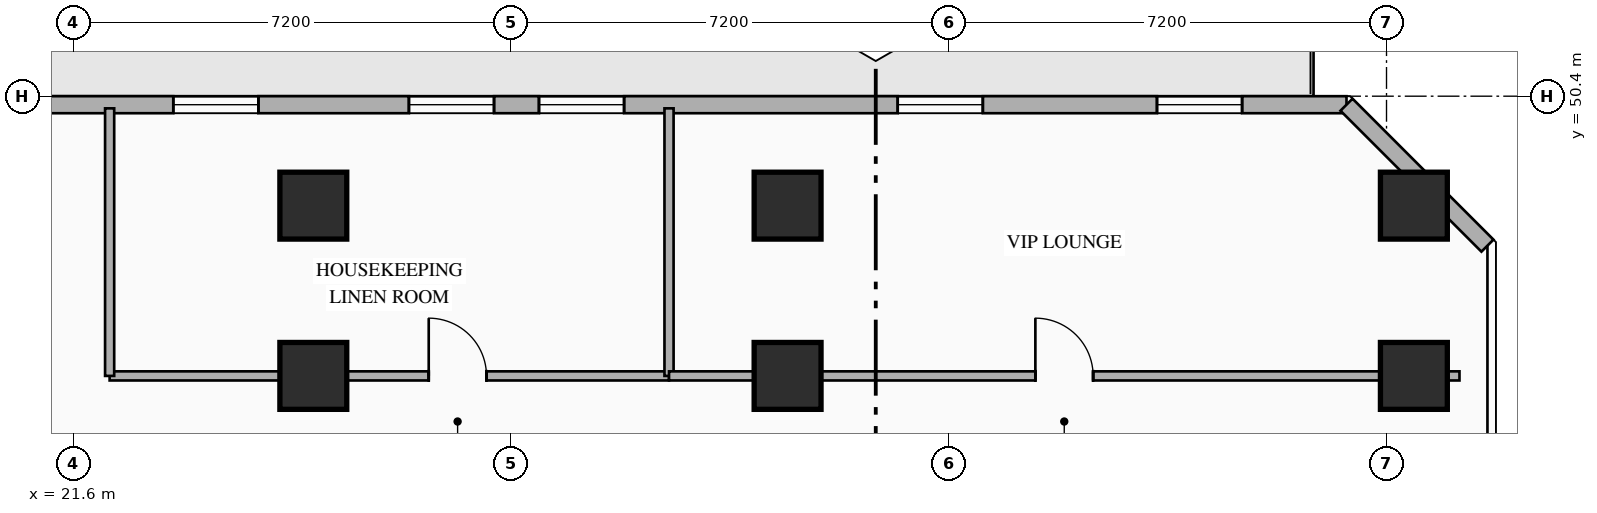
"""IFC4 building model, lengths in metres.
Left out: names, types, materials, properties, quantities, classifications, styles, units other than length and angle.
Written with IfcOpenShell. Run it as: python <this file> out.ifc"""

import sys

from ifc_helpers import new_model, si_unit, direction, frame, frame_2d, origin, origin_2d, place, context, subcontext, project, spatial, rectangle, hollow_rectangle, extrude, element, fill, save


model = new_model("IFC4")
c1 = context("Model", 3, precision=1e-05, world=origin(), true_north=direction((0.0, 1.0)))
c2 = subcontext(c1, "Body", "Model", "MODEL_VIEW")
j1 = project(units=[si_unit("LENGTHUNIT", "METRE"), si_unit("PLANEANGLEUNIT", "RADIAN")], contexts=[c1])
p1 = place(None, origin())
s1 = spatial("IfcSite", under=j1, at=p1, CompositionType="ELEMENT")
p2 = place(p1, origin())
s2 = spatial("IfcBuilding", under=s1, at=p2, CompositionType="ELEMENT")
p3 = place(p2, frame((0.0, 0.0, 46.65)))
s3 = spatial("IfcBuildingStorey", under=s2, at=p3, CompositionType="ELEMENT", Elevation=46.65)
for number, where, z_axis, x_axis in (
    (1, (25.55, 45.8, 0.0), (0.0, 0.0, 1.0), (1.0, 0.0, 0.0)),
    (2, (33.35, 45.8, 0.0), (0.0, 0.0, 1.0), (1.0, 0.0, 0.0)),
    (3, (43.65, 45.8, 0.0), (0.0, 0.0, 1.0), (1.0, 0.0, 0.0)),
    (4, (25.55, 48.6, 0.0), (0.0, 0.0, 1.0), (1.0, 0.0, 0.0)),
    (5, (33.35, 48.6, 0.0), (0.0, 0.0, 1.0), (1.0, 0.0, 0.0)),
    (6, (43.65, 48.6, 0.0), (0.0, 0.0, 1.0), (1.0, 0.0, 0.0)),
):
    element("IfcColumn", number, at=place(p3, frame(where, z_axis=z_axis, x_axis=x_axis)), inside=s3, PredefinedType="COLUMN", context=c2, shape_type="SweptSolid", body=[
        extrude(hollow_rectangle(XDim=1.1, YDim=1.1, WallThickness=0.04, at=origin_2d()), origin(), (0.0, 0.0, 1.0), 3.35),
    ])
p4 = place(p3, frame((2.458, 50.26, 0.0), z_axis=(0.0, 0.0, 1.0), x_axis=(1.0, 0.0, 0.0)))
e7 = element("IfcWall", 7, at=p4, inside=s3, PredefinedType="STANDARD", context=c2, shape_type="SweptSolid", body=[
    extrude(rectangle(XDim=40.084, YDim=0.28, at=frame_2d((20.042, 0.0))), origin(), (0.0, 0.0, 1.0), 3.13),
])
p5 = place(p4, frame((4.26, 0.0, 0.0)))
e8 = element("IfcOpeningElement", 8, at=p5, cuts=e7, PredefinedType="OPENING", context=c2, shape_type="SweptSolid", body=[
    extrude(rectangle(XDim=1.1, YDim=2.2, at=frame_2d((0.55, 1.1))), frame((0.0, 0.15, 0.0), z_axis=(0.0, -1.0, 0.0), x_axis=(1.0, 0.0, 0.0)), (0.0, 0.0, 1.0), 0.3),
])
p6 = place(p4, frame((0.46, 0.0, 0.85)))
e9 = element("IfcOpeningElement", 9, at=p6, cuts=e7, PredefinedType="OPENING", context=c2, shape_type="SweptSolid", body=[
    extrude(rectangle(XDim=1.4, YDim=1.8, at=frame_2d((0.7, 0.9))), frame((0.0, 0.15, 0.0), z_axis=(0.0, -1.0, 0.0), x_axis=(1.0, 0.0, 0.0)), (0.0, 0.0, 1.0), 0.3),
])
p7 = place(p4, frame((10.0, 0.0, 0.85)))
e10 = element("IfcOpeningElement", 10, at=p7, cuts=e7, PredefinedType="OPENING", context=c2, shape_type="SweptSolid", body=[
    extrude(rectangle(XDim=1.4, YDim=1.8, at=frame_2d((0.7, 0.9))), frame((0.0, 0.15, 0.0), z_axis=(0.0, -1.0, 0.0), x_axis=(1.0, 0.0, 0.0)), (0.0, 0.0, 1.0), 0.3),
])
p8 = place(p4, frame((14.02, 0.0, 0.85)))
e11 = element("IfcOpeningElement", 11, at=p8, cuts=e7, PredefinedType="OPENING", context=c2, shape_type="SweptSolid", body=[
    extrude(rectangle(XDim=1.4, YDim=1.8, at=frame_2d((0.7, 0.9))), frame((0.0, 0.15, 0.0), z_axis=(0.0, -1.0, 0.0), x_axis=(1.0, 0.0, 0.0)), (0.0, 0.0, 1.0), 0.3),
])
p9 = place(p4, frame((20.789, 0.0, 0.85)))
e12 = element("IfcOpeningElement", 12, at=p9, cuts=e7, PredefinedType="OPENING", context=c2, shape_type="SweptSolid", body=[
    extrude(rectangle(XDim=1.4, YDim=1.8, at=frame_2d((0.7, 0.9))), frame((0.0, 0.15, 0.0), z_axis=(0.0, -1.0, 0.0), x_axis=(1.0, 0.0, 0.0)), (0.0, 0.0, 1.0), 0.3),
])
p10 = place(p4, frame((24.664, 0.0, 0.85)))
e13 = element("IfcOpeningElement", 13, at=p10, cuts=e7, PredefinedType="OPENING", context=c2, shape_type="SweptSolid", body=[
    extrude(rectangle(XDim=1.4, YDim=1.8, at=frame_2d((0.7, 0.9))), frame((0.0, 0.15, 0.0), z_axis=(0.0, -1.0, 0.0), x_axis=(1.0, 0.0, 0.0)), (0.0, 0.0, 1.0), 0.3),
])
p11 = place(p4, frame((26.803, 0.0, 0.85)))
e14 = element("IfcOpeningElement", 14, at=p11, cuts=e7, PredefinedType="OPENING", context=c2, shape_type="SweptSolid", body=[
    extrude(rectangle(XDim=1.4, YDim=1.8, at=frame_2d((0.7, 0.9))), frame((0.0, 0.15, 0.0), z_axis=(0.0, -1.0, 0.0), x_axis=(1.0, 0.0, 0.0)), (0.0, 0.0, 1.0), 0.3),
])
p12 = place(p4, frame((32.703, 0.0, 0.85)))
e15 = element("IfcOpeningElement", 15, at=p12, cuts=e7, PredefinedType="OPENING", context=c2, shape_type="SweptSolid", body=[
    extrude(rectangle(XDim=1.4, YDim=1.8, at=frame_2d((0.7, 0.9))), frame((0.0, 0.15, 0.0), z_axis=(0.0, -1.0, 0.0), x_axis=(1.0, 0.0, 0.0)), (0.0, 0.0, 1.0), 0.3),
])
p13 = place(p4, frame((36.967, 0.0, 0.85)))
e16 = element("IfcOpeningElement", 16, at=p13, cuts=e7, PredefinedType="OPENING", context=c2, shape_type="SweptSolid", body=[
    extrude(rectangle(XDim=1.4, YDim=1.8, at=frame_2d((0.7, 0.9))), frame((0.0, 0.15, 0.0), z_axis=(0.0, -1.0, 0.0), x_axis=(1.0, 0.0, 0.0)), (0.0, 0.0, 1.0), 0.3),
])
p14 = place(p3, frame((42.542, 50.26, 0.0), z_axis=(0.0, 0.0, 1.0), x_axis=(0.707106781187, -0.707106781187, 0.0)))
e17 = element("IfcWall", 17, at=p14, inside=s3, PredefinedType="STANDARD", context=c2, shape_type="SweptSolid", body=[
    extrude(rectangle(XDim=3.278, YDim=0.28, at=frame_2d((1.639, 0.0))), origin(), (0.0, 0.0, 1.0), 3.13),
])
p15 = place(p3, frame((22.2, 45.8, 0.0), z_axis=(0.0, 0.0, 1.0), x_axis=(1.0, 0.0, 0.0)))
e18 = element("IfcWall", 18, at=p15, inside=s3, PredefinedType="PARTITIONING", context=c2, shape_type="SweptSolid", body=[
    extrude(rectangle(XDim=9.2, YDim=0.15, at=frame_2d((4.6, 0.0))), origin(), (0.0, 0.0, 1.0), 2.425),
])
p16 = place(p15, frame((5.248, 0.0, 0.0)))
e19 = element("IfcOpeningElement", 19, at=p16, cuts=e18, PredefinedType="OPENING", context=c2, shape_type="SweptSolid", body=[
    extrude(rectangle(XDim=0.95, YDim=2.15, at=frame_2d((0.475, 1.075))), frame((0.0, 0.085, 0.0), z_axis=(0.0, -1.0, 0.0), x_axis=(1.0, 0.0, 0.0)), (0.0, 0.0, 1.0), 0.17),
])
for number, where, z_axis, x_axis in (
    (20, (22.2, 45.8, 0.0), (0.0, 0.0, 1.0), (0.0, 1.0, 0.0)),
    (21, (31.4, 45.8, 0.0), (0.0, 0.0, 1.0), (0.0, 1.0, 0.0)),
):
    element("IfcWall", number, at=place(p3, frame(where, z_axis=z_axis, x_axis=x_axis)), inside=s3, PredefinedType="PARTITIONING", context=c2, shape_type="SweptSolid", body=[
        extrude(rectangle(XDim=4.4, YDim=0.15, at=frame_2d((2.2, 0.0))), origin(), (0.0, 0.0, 1.0), 3.13),
    ])
p17 = place(p3, frame((31.4, 45.8, 0.0), z_axis=(0.0, 0.0, 1.0), x_axis=(1.0, 0.0, 0.0)))
e22 = element("IfcWall", 22, at=p17, inside=s3, PredefinedType="PARTITIONING", context=c2, shape_type="SweptSolid", body=[
    extrude(rectangle(XDim=13.0, YDim=0.15, at=frame_2d((6.5, 0.0))), origin(), (0.0, 0.0, 1.0), 2.425),
])
p18 = place(p17, frame((6.025, 0.0, 0.0)))
e23 = element("IfcOpeningElement", 23, at=p18, cuts=e22, PredefinedType="OPENING", context=c2, shape_type="SweptSolid", body=[
    extrude(rectangle(XDim=0.95, YDim=2.15, at=frame_2d((0.475, 1.075))), frame((0.0, 0.085, 0.0), z_axis=(0.0, -1.0, 0.0), x_axis=(1.0, 0.0, 0.0)), (0.0, 0.0, 1.0), 0.17),
])
p19 = place(p9, origin())
e24 = element("IfcWindow", 24, at=p19, inside=s3, PartitioningType="SINGLE_PANEL", PredefinedType="WINDOW", context=c2, shape_type="SweptSolid", body=[
    extrude(rectangle(XDim=1.4, YDim=1.8, at=frame_2d((0.7, 0.9))), frame((0.0, 0.03, 0.0), z_axis=(0.0, -1.0, 0.0), x_axis=(1.0, 0.0, 0.0)), (0.0, 0.0, 1.0), 0.06),
])
fill(e12, e24)
p20 = place(p10, origin())
e25 = element("IfcWindow", 25, at=p20, inside=s3, PartitioningType="SINGLE_PANEL", PredefinedType="WINDOW", context=c2, shape_type="SweptSolid", body=[
    extrude(rectangle(XDim=1.4, YDim=1.8, at=frame_2d((0.7, 0.9))), frame((0.0, 0.03, 0.0), z_axis=(0.0, -1.0, 0.0), x_axis=(1.0, 0.0, 0.0)), (0.0, 0.0, 1.0), 0.06),
])
fill(e13, e25)
p21 = place(p11, origin())
e26 = element("IfcWindow", 26, at=p21, inside=s3, PartitioningType="SINGLE_PANEL", PredefinedType="WINDOW", context=c2, shape_type="SweptSolid", body=[
    extrude(rectangle(XDim=1.4, YDim=1.8, at=frame_2d((0.7, 0.9))), frame((0.0, 0.03, 0.0), z_axis=(0.0, -1.0, 0.0), x_axis=(1.0, 0.0, 0.0)), (0.0, 0.0, 1.0), 0.06),
])
fill(e14, e26)
p22 = place(p12, origin())
e27 = element("IfcWindow", 27, at=p22, inside=s3, PartitioningType="SINGLE_PANEL", PredefinedType="WINDOW", context=c2, shape_type="SweptSolid", body=[
    extrude(rectangle(XDim=1.4, YDim=1.8, at=frame_2d((0.7, 0.9))), frame((0.0, 0.03, 0.0), z_axis=(0.0, -1.0, 0.0), x_axis=(1.0, 0.0, 0.0)), (0.0, 0.0, 1.0), 0.06),
])
fill(e15, e27)
p23 = place(p13, origin())
e28 = element("IfcWindow", 28, at=p23, inside=s3, PartitioningType="SINGLE_PANEL", PredefinedType="WINDOW", context=c2, shape_type="SweptSolid", body=[
    extrude(rectangle(XDim=1.4, YDim=1.8, at=frame_2d((0.7, 0.9))), frame((0.0, 0.03, 0.0), z_axis=(0.0, -1.0, 0.0), x_axis=(1.0, 0.0, 0.0)), (0.0, 0.0, 1.0), 0.06),
])
fill(e16, e28)
p24 = place(p16, origin())
e29 = element("IfcDoor", 29, at=p24, inside=s3, OperationType="SINGLE_SWING_LEFT", PredefinedType="DOOR", context=c2, shape_type="SweptSolid", body=[
    extrude(rectangle(XDim=0.95, YDim=2.15, at=frame_2d((0.475, 1.075))), frame((0.0, 0.025, 0.0), z_axis=(0.0, -1.0, 0.0), x_axis=(1.0, 0.0, 0.0)), (0.0, 0.0, 1.0), 0.05),
])
fill(e19, e29)
p25 = place(p18, origin())
e30 = element("IfcDoor", 30, at=p25, inside=s3, OperationType="SINGLE_SWING_LEFT", PredefinedType="DOOR", context=c2, shape_type="SweptSolid", body=[
    extrude(rectangle(XDim=0.95, YDim=2.15, at=frame_2d((0.475, 1.075))), frame((0.0, 0.025, 0.0), z_axis=(0.0, -1.0, 0.0), x_axis=(1.0, 0.0, 0.0)), (0.0, 0.0, 1.0), 0.05),
])
fill(e23, e30)
save(model, sys.argv[1])
